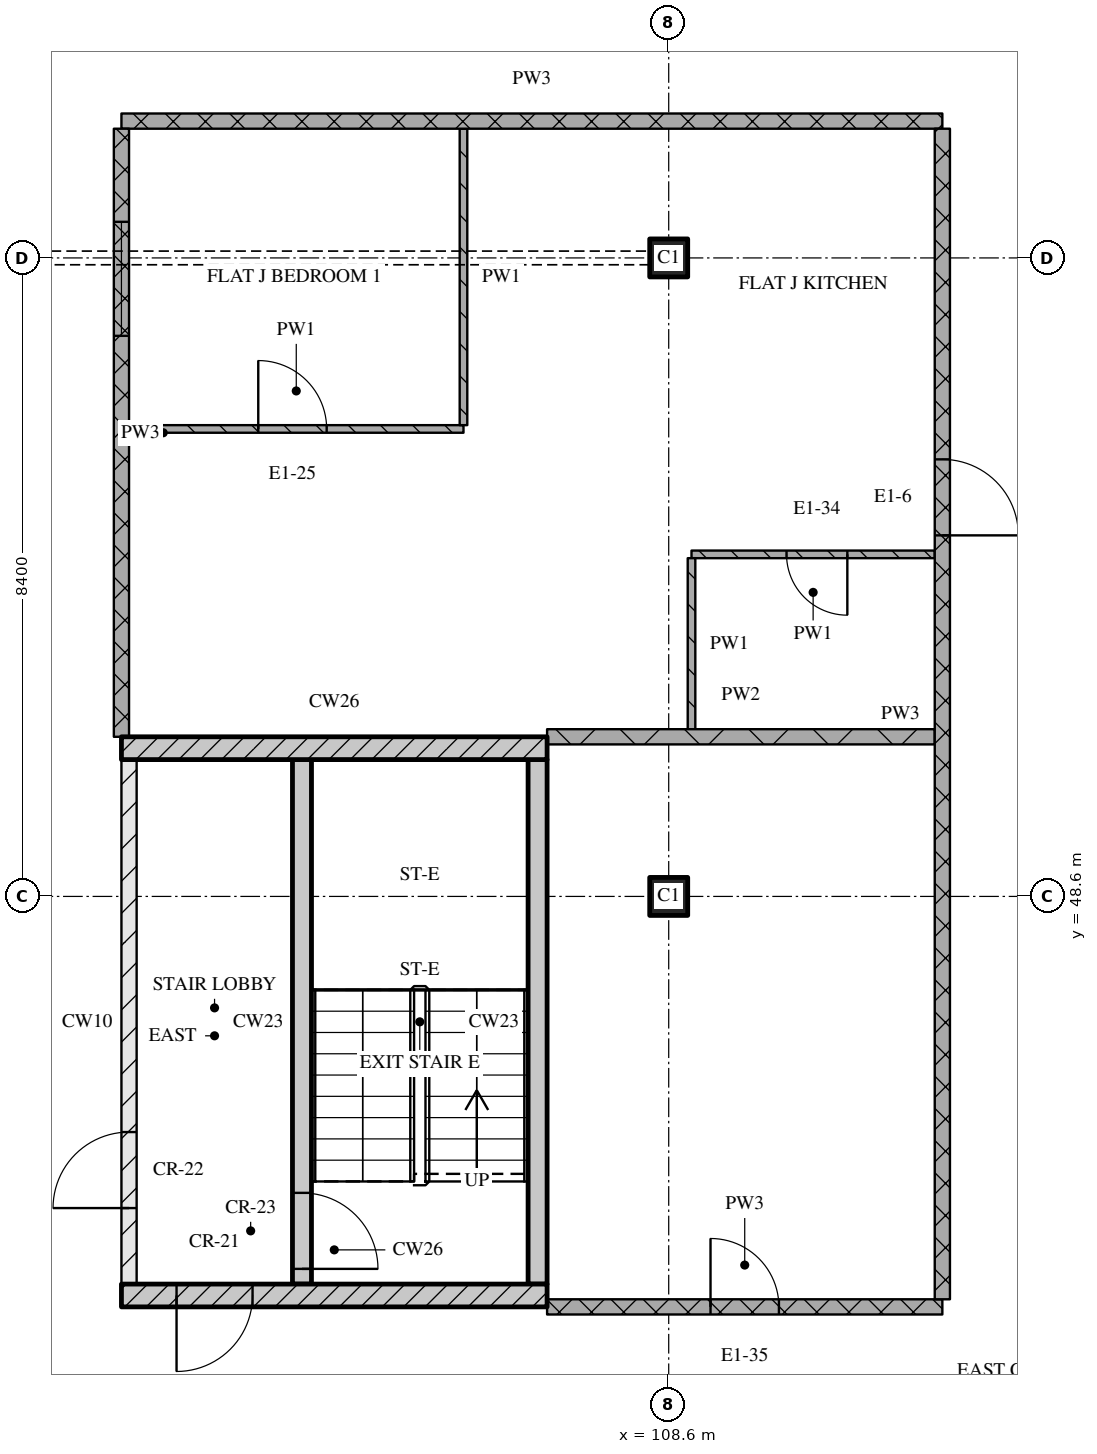
"""IFC4 building model, lengths in metres.
Left out: names, types, materials, properties, quantities, classifications, styles, units other than length and angle.
Written with IfcOpenShell. Run it as: python <this file> out.ifc"""

import sys

from ifc_helpers import new_model, si_unit, direction, frame, frame_2d, origin, origin_2d, place, context, subcontext, project, spatial, rectangle, extrude, element, fill, save


model = new_model("IFC4")
c1 = context("Model", 3, precision=1e-05, world=origin(), true_north=direction((0.0, 1.0)))
c2 = subcontext(c1, "Body", "Model", "MODEL_VIEW")
j1 = project(units=[si_unit("LENGTHUNIT", "METRE"), si_unit("PLANEANGLEUNIT", "RADIAN")], contexts=[c1])
p1 = place(None, origin())
s1 = spatial("IfcSite", under=j1, at=p1, CompositionType="ELEMENT")
p2 = place(p1, origin())
s2 = spatial("IfcBuilding", under=s1, at=p2, CompositionType="ELEMENT")
p3 = place(p2, frame((0.0, 0.0, 267.15)))
s3 = spatial("IfcBuildingStorey", under=s2, at=p3, CompositionType="ELEMENT", Elevation=267.15)
for number, where, z_axis, x_axis in (
    (1, (108.6, 48.6, 0.0), (0.0, 0.0, 1.0), (1.0, 0.0, 0.0)),
    (2, (108.6, 57.0, 0.0), (0.0, 0.0, 1.0), (1.0, 0.0, 0.0)),
):
    element("IfcColumn", number, at=place(p3, frame(where, z_axis=z_axis, x_axis=x_axis)), inside=s3, PredefinedType="COLUMN", context=c2, shape_type="SweptSolid", body=[
        extrude(rectangle(XDim=0.5, YDim=0.5, at=origin_2d()), origin(), (0.0, 0.0, 1.0), 3.6),
    ])
p4 = place(p3, frame((101.4, 43.35, 0.0), z_axis=(0.0, 0.0, 1.0), x_axis=(1.0, 0.0, 0.0)))
e3 = element("IfcWall", 3, at=p4, inside=s3, PredefinedType="SOLIDWALL", context=c2, shape_type="SweptSolid", body=[
    extrude(rectangle(XDim=5.6, YDim=0.3, at=frame_2d((2.8, 0.0))), origin(), (0.0, 0.0, 1.0), 3.32),
])
p5 = place(p4, frame((0.725, 0.0, 0.0)))
e4 = element("IfcOpeningElement", 4, at=p5, cuts=e3, PredefinedType="OPENING", context=c2, shape_type="SweptSolid", body=[
    extrude(rectangle(XDim=1.0, YDim=2.1, at=frame_2d((0.5, 1.05))), frame((0.0, 0.16, 0.0), z_axis=(0.0, -1.0, 0.0), x_axis=(1.0, 0.0, 0.0)), (0.0, 0.0, 1.0), 0.32),
])
p6 = place(p3, frame((101.5, 43.5, 0.0), z_axis=(0.0, 0.0, 1.0), x_axis=(0.0, 1.0, 0.0)))
e5 = element("IfcWall", 5, at=p6, inside=s3, PredefinedType="PARTITIONING", context=c2, shape_type="SweptSolid", body=[
    extrude(rectangle(XDim=6.9, YDim=0.2, at=frame_2d((3.45, 0.0))), origin(), (0.0, 0.0, 1.0), 3.32),
])
p7 = place(p6, frame((1.0, 0.0, 0.0)))
e6 = element("IfcOpeningElement", 6, at=p7, cuts=e5, PredefinedType="OPENING", context=c2, shape_type="SweptSolid", body=[
    extrude(rectangle(XDim=1.0, YDim=2.1, at=frame_2d((0.5, 1.05))), frame((0.0, 0.11, 0.0), z_axis=(0.0, -1.0, 0.0), x_axis=(1.0, 0.0, 0.0)), (0.0, 0.0, 1.0), 0.22),
])
p8 = place(p3, frame((103.775, 43.5, 0.0), z_axis=(0.0, 0.0, 1.0), x_axis=(0.0, 1.0, 0.0)))
e7 = element("IfcWall", 7, at=p8, inside=s3, PredefinedType="SOLIDWALL", context=c2, shape_type="SweptSolid", body=[
    extrude(rectangle(XDim=6.9, YDim=0.25, at=frame_2d((3.45, 0.0))), origin(), (0.0, 0.0, 1.0), 3.32),
])
p9 = place(p8, frame((0.2, 0.0, 0.0)))
e8 = element("IfcOpeningElement", 8, at=p9, cuts=e7, PredefinedType="OPENING", context=c2, shape_type="SweptSolid", body=[
    extrude(rectangle(XDim=1.0, YDim=2.1, at=frame_2d((0.5, 1.05))), frame((0.0, 0.135, 0.0), z_axis=(0.0, -1.0, 0.0), x_axis=(1.0, 0.0, 0.0)), (0.0, 0.0, 1.0), 0.27),
])
p10 = place(p3, frame((106.875, 43.5, 0.0), z_axis=(0.0, 0.0, 1.0), x_axis=(0.0, 1.0, 0.0)))
e9 = element("IfcWall", 9, at=p10, inside=s3, PredefinedType="SOLIDWALL", context=c2, shape_type="SweptSolid", body=[
    extrude(rectangle(XDim=6.9, YDim=0.25, at=frame_2d((3.45, 0.0))), origin(), (0.0, 0.0, 1.0), 3.32),
])
p11 = place(p3, frame((101.4, 50.55, 0.0), z_axis=(0.0, 0.0, 1.0), x_axis=(1.0, 0.0, 0.0)))
e10 = element("IfcWall", 10, at=p11, inside=s3, PredefinedType="SOLIDWALL", context=c2, shape_type="SweptSolid", body=[
    extrude(rectangle(XDim=5.6, YDim=0.3, at=frame_2d((2.8, 0.0))), origin(), (0.0, 0.0, 1.0), 3.32),
])
p12 = place(p3, frame((107.0, 43.2, 0.0), z_axis=(0.0, 0.0, 1.0), x_axis=(1.0, 0.0, 0.0)))
e11 = element("IfcWall", 11, at=p12, inside=s3, PredefinedType="PARTITIONING", context=c2, shape_type="SweptSolid", body=[
    extrude(rectangle(XDim=5.2, YDim=0.2, at=frame_2d((2.6, 0.0))), origin(), (0.0, 0.0, 1.0), 3.32),
])
p13 = place(p12, frame((2.15, 0.0, 0.0)))
e12 = element("IfcOpeningElement", 12, at=p13, cuts=e11, PredefinedType="OPENING", context=c2, shape_type="SweptSolid", body=[
    extrude(rectangle(XDim=0.9, YDim=2.1, at=frame_2d((0.45, 1.05))), frame((0.0, 0.11, 0.0), z_axis=(0.0, -1.0, 0.0), x_axis=(1.0, 0.0, 0.0)), (0.0, 0.0, 1.0), 0.22),
])
p14 = place(p3, frame((107.0, 50.7, 0.0), z_axis=(0.0, 0.0, 1.0), x_axis=(1.0, 0.0, 0.0)))
e13 = element("IfcWall", 13, at=p14, inside=s3, PredefinedType="PARTITIONING", context=c2, shape_type="SweptSolid", body=[
    extrude(rectangle(XDim=5.1, YDim=0.2, at=frame_2d((2.55, 0.0))), origin(), (0.0, 0.0, 1.0), 3.32),
])
p15 = place(p3, frame((112.1, 53.1, 0.0), z_axis=(0.0, 0.0, 1.0), x_axis=(-1.0, 0.0, 0.0)))
e14 = element("IfcWall", 14, at=p15, inside=s3, PredefinedType="PARTITIONING", context=c2, shape_type="SweptSolid", body=[
    extrude(rectangle(XDim=3.2, YDim=0.1, at=frame_2d((1.6, 0.0))), origin(), (0.0, 0.0, 1.0), 3.32),
])
p16 = place(p15, frame((1.15, 0.0, 0.0)))
e15 = element("IfcOpeningElement", 15, at=p16, cuts=e14, PredefinedType="OPENING", context=c2, shape_type="SweptSolid", body=[
    extrude(rectangle(XDim=0.8, YDim=2.1, at=frame_2d((0.4, 1.05))), frame((0.0, 0.06, 0.0), z_axis=(0.0, -1.0, 0.0), x_axis=(1.0, 0.0, 0.0)), (0.0, 0.0, 1.0), 0.12),
])
p17 = place(p3, frame((101.5, 54.75, 0.0), z_axis=(0.0, 0.0, 1.0), x_axis=(1.0, 0.0, 0.0)))
e16 = element("IfcWall", 16, at=p17, inside=s3, PredefinedType="PARTITIONING", context=c2, shape_type="SweptSolid", body=[
    extrude(rectangle(XDim=4.4, YDim=0.1, at=frame_2d((2.2, 0.0))), origin(), (0.0, 0.0, 1.0), 3.32),
])
p18 = place(p17, frame((1.7, 0.0, 0.0)))
e17 = element("IfcOpeningElement", 17, at=p18, cuts=e16, PredefinedType="OPENING", context=c2, shape_type="SweptSolid", body=[
    extrude(rectangle(XDim=0.9, YDim=2.1, at=frame_2d((0.45, 1.05))), frame((0.0, 0.06, 0.0), z_axis=(0.0, -1.0, 0.0), x_axis=(1.0, 0.0, 0.0)), (0.0, 0.0, 1.0), 0.12),
])
p19 = place(p3, frame((101.4, 58.8, 0.0), z_axis=(0.0, 0.0, 1.0), x_axis=(1.0, 0.0, 0.0)))
e18 = element("IfcWall", 18, at=p19, inside=s3, PredefinedType="PARTITIONING", context=c2, shape_type="SweptSolid", body=[
    extrude(rectangle(XDim=10.8, YDim=0.2, at=frame_2d((5.4, 0.0))), origin(), (0.0, 0.0, 1.0), 3.32),
])
p20 = place(p3, frame((101.4, 58.7, 0.0), z_axis=(0.0, 0.0, 1.0), x_axis=(0.0, -1.0, 0.0)))
e19 = element("IfcWall", 19, at=p20, inside=s3, PredefinedType="PARTITIONING", context=c2, shape_type="SweptSolid", body=[
    extrude(rectangle(XDim=8.0, YDim=0.2, at=frame_2d((4.0, 0.0))), origin(), (0.0, 0.0, 1.0), 3.32),
])
p21 = place(p20, frame((1.225, 0.0, 0.9)))
e20 = element("IfcOpeningElement", 20, at=p21, cuts=e19, PredefinedType="OPENING", context=c2, shape_type="SweptSolid", body=[
    extrude(rectangle(XDim=1.5, YDim=1.5, at=frame_2d((0.75, 0.75))), frame((0.0, 0.11, 0.0), z_axis=(0.0, -1.0, 0.0), x_axis=(1.0, 0.0, 0.0)), (0.0, 0.0, 1.0), 0.22),
])
p22 = place(p3, frame((105.9, 58.7, 0.0), z_axis=(0.0, 0.0, 1.0), x_axis=(0.0, -1.0, 0.0)))
e21 = element("IfcWall", 21, at=p22, inside=s3, PredefinedType="PARTITIONING", context=c2, shape_type="SweptSolid", body=[
    extrude(rectangle(XDim=3.9, YDim=0.1, at=frame_2d((1.95, 0.0))), origin(), (0.0, 0.0, 1.0), 3.32),
])
p23 = place(p3, frame((108.9, 53.05, 0.0), z_axis=(0.0, 0.0, 1.0), x_axis=(0.0, -1.0, 0.0)))
e22 = element("IfcWall", 22, at=p23, inside=s3, PredefinedType="PARTITIONING", context=c2, shape_type="SweptSolid", body=[
    extrude(rectangle(XDim=2.25, YDim=0.1, at=frame_2d((1.125, 0.0))), origin(), (0.0, 0.0, 1.0), 3.32),
])
p24 = place(p3, frame((112.2, 43.3, 0.0), z_axis=(0.0, 0.0, 1.0), x_axis=(0.0, 1.0, 0.0)))
e23 = element("IfcWall", 23, at=p24, inside=s3, PredefinedType="PARTITIONING", context=c2, shape_type="SweptSolid", body=[
    extrude(rectangle(XDim=15.4, YDim=0.2, at=frame_2d((7.7, 0.0))), origin(), (0.0, 0.0, 1.0), 3.32),
])
p25 = place(p24, frame((10.05, 0.0, 0.0)))
e24 = element("IfcOpeningElement", 24, at=p25, cuts=e23, PredefinedType="OPENING", context=c2, shape_type="SweptSolid", body=[
    extrude(rectangle(XDim=1.0, YDim=2.1, at=frame_2d((0.5, 1.05))), frame((0.0, 0.11, 0.0), z_axis=(0.0, -1.0, 0.0), x_axis=(1.0, 0.0, 0.0)), (0.0, 0.0, 1.0), 0.22),
])
p26 = place(p5, origin())
e25 = element("IfcDoor", 25, at=p26, inside=s3, OperationType="SINGLE_SWING_RIGHT", PredefinedType="DOOR", context=c2, shape_type="SweptSolid", body=[
    extrude(rectangle(XDim=1.0, YDim=2.1, at=frame_2d((0.5, 1.05))), frame((0.0, 0.025, 0.0), z_axis=(0.0, -1.0, 0.0), x_axis=(1.0, 0.0, 0.0)), (0.0, 0.0, 1.0), 0.05),
])
fill(e4, e25)
p27 = place(p9, origin())
e26 = element("IfcDoor", 26, at=p27, inside=s3, OperationType="SINGLE_SWING_RIGHT", PredefinedType="DOOR", context=c2, shape_type="SweptSolid", body=[
    extrude(rectangle(XDim=1.0, YDim=2.1, at=frame_2d((0.5, 1.05))), frame((0.0, 0.025, 0.0), z_axis=(0.0, -1.0, 0.0), x_axis=(1.0, 0.0, 0.0)), (0.0, 0.0, 1.0), 0.05),
])
fill(e8, e26)
p28 = place(p7, origin())
e27 = element("IfcDoor", 27, at=p28, inside=s3, OperationType="SINGLE_SWING_LEFT", PredefinedType="DOOR", context=c2, shape_type="SweptSolid", body=[
    extrude(rectangle(XDim=1.0, YDim=2.1, at=frame_2d((0.5, 1.05))), frame((0.0, 0.025, 0.0), z_axis=(0.0, -1.0, 0.0), x_axis=(1.0, 0.0, 0.0)), (0.0, 0.0, 1.0), 0.05),
])
fill(e6, e27)
p29 = place(p13, origin())
e28 = element("IfcDoor", 28, at=p29, inside=s3, OperationType="SINGLE_SWING_LEFT", PredefinedType="DOOR", context=c2, shape_type="SweptSolid", body=[
    extrude(rectangle(XDim=0.9, YDim=2.1, at=frame_2d((0.45, 1.05))), frame((0.0, 0.025, 0.0), z_axis=(0.0, -1.0, 0.0), x_axis=(1.0, 0.0, 0.0)), (0.0, 0.0, 1.0), 0.05),
])
fill(e12, e28)
p30 = place(p16, origin())
e29 = element("IfcDoor", 29, at=p30, inside=s3, OperationType="SINGLE_SWING_LEFT", PredefinedType="DOOR", context=c2, shape_type="SweptSolid", body=[
    extrude(rectangle(XDim=0.8, YDim=2.1, at=frame_2d((0.4, 1.05))), frame((0.0, 0.025, 0.0), z_axis=(0.0, -1.0, 0.0), x_axis=(1.0, 0.0, 0.0)), (0.0, 0.0, 1.0), 0.05),
])
fill(e15, e29)
p31 = place(p18, origin())
e30 = element("IfcDoor", 30, at=p31, inside=s3, OperationType="SINGLE_SWING_LEFT", PredefinedType="DOOR", context=c2, shape_type="SweptSolid", body=[
    extrude(rectangle(XDim=0.9, YDim=2.1, at=frame_2d((0.45, 1.05))), frame((0.0, 0.025, 0.0), z_axis=(0.0, -1.0, 0.0), x_axis=(1.0, 0.0, 0.0)), (0.0, 0.0, 1.0), 0.05),
])
fill(e17, e30)
p32 = place(p25, origin())
e31 = element("IfcDoor", 31, at=p32, inside=s3, OperationType="SINGLE_SWING_RIGHT", PredefinedType="DOOR", context=c2, shape_type="SweptSolid", body=[
    extrude(rectangle(XDim=1.0, YDim=2.1, at=frame_2d((0.5, 1.05))), frame((0.0, 0.025, 0.0), z_axis=(0.0, -1.0, 0.0), x_axis=(1.0, 0.0, 0.0)), (0.0, 0.0, 1.0), 0.05),
])
fill(e24, e31)
p33 = place(p21, origin())
e32 = element("IfcWindow", 32, at=p33, inside=s3, PartitioningType="SINGLE_PANEL", PredefinedType="WINDOW", context=c2, shape_type="SweptSolid", body=[
    extrude(rectangle(XDim=1.5, YDim=1.5, at=frame_2d((0.75, 0.75))), frame((0.0, 0.03, 0.0), z_axis=(0.0, -1.0, 0.0), x_axis=(1.0, 0.0, 0.0)), (0.0, 0.0, 1.0), 0.06),
])
fill(e20, e32)
save(model, sys.argv[1])
